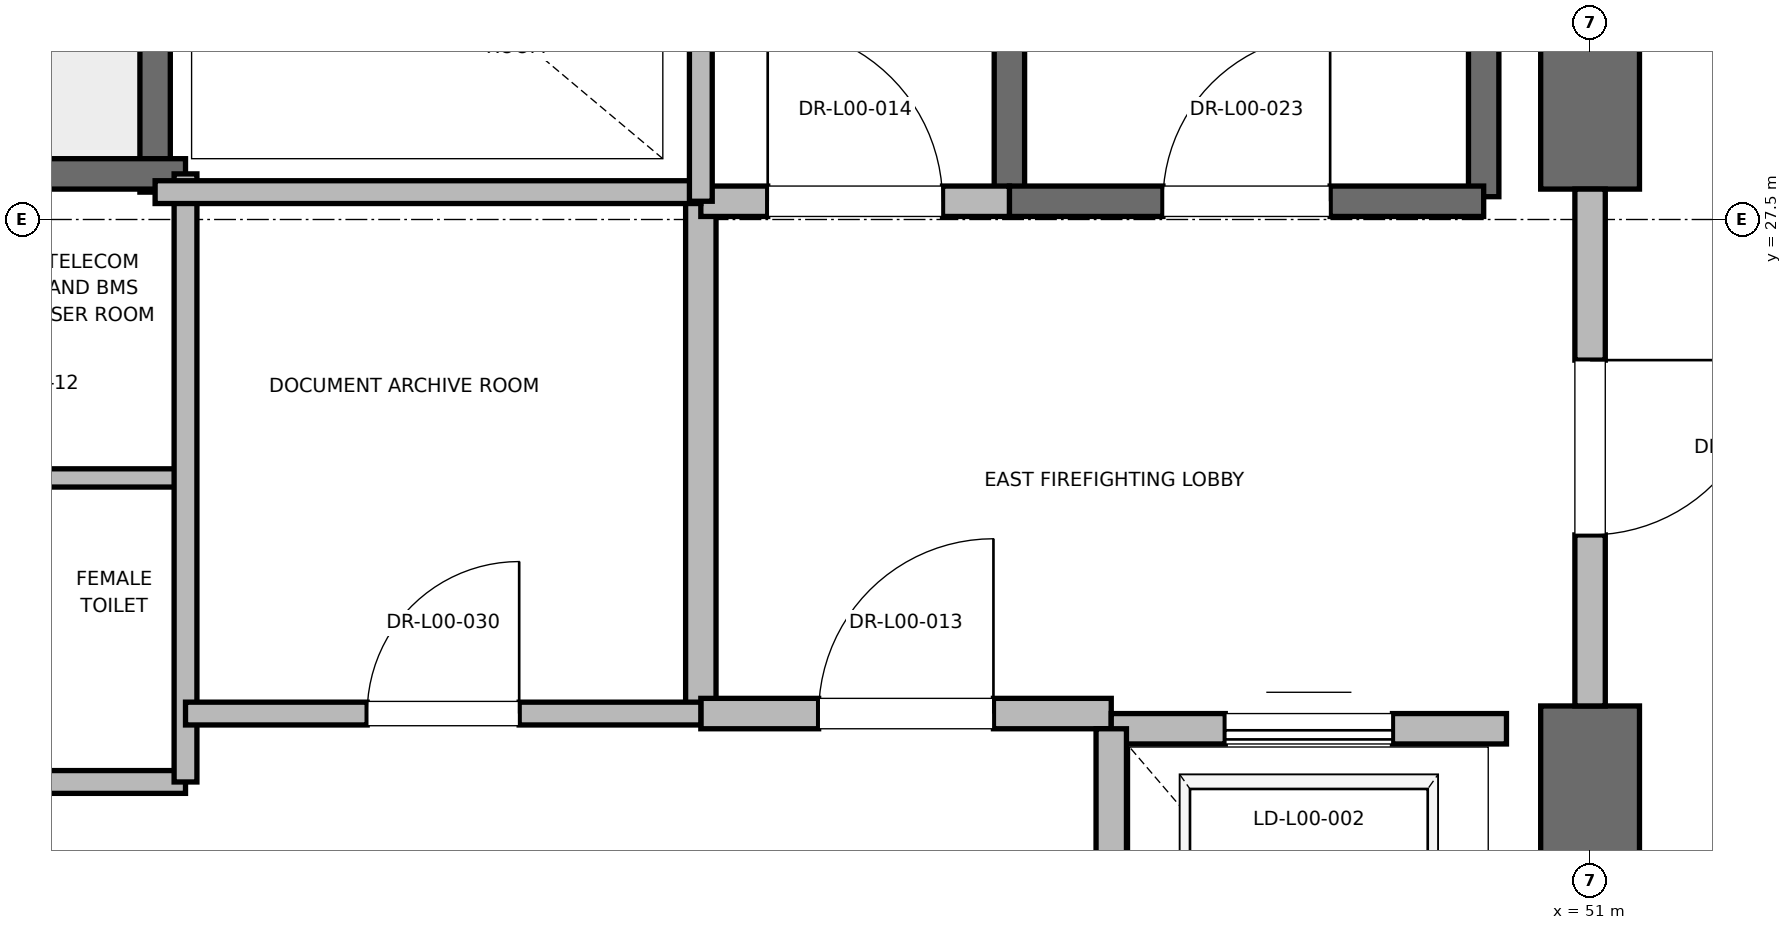
"""IFC4 building model, lengths in metres.
Left out: names, types, materials, properties, quantities, classifications, styles, units other than length and angle.
Written with IfcOpenShell. Run it as: python <this file> out.ifc"""

import sys

from ifc_helpers import new_model, si_unit, direction, frame, frame_2d, origin, place, context, subcontext, project, spatial, rectangle, extrude, element, fill, save


model = new_model("IFC4")
c1 = context("Model", 3, precision=1e-05, world=origin(), true_north=direction((0.0, 1.0)))
c2 = subcontext(c1, "Body", "Model", "MODEL_VIEW")
j1 = project(units=[si_unit("LENGTHUNIT", "METRE"), si_unit("PLANEANGLEUNIT", "RADIAN")], contexts=[c1])
p1 = place(None, origin())
s1 = spatial("IfcSite", under=j1, at=p1, CompositionType="ELEMENT")
p2 = place(p1, origin())
s2 = spatial("IfcBuilding", under=s1, at=p2, CompositionType="ELEMENT")
p3 = place(p2, origin())
s3 = spatial("IfcBuildingStorey", under=s2, at=p3, CompositionType="ELEMENT", Elevation=0.0)
p4 = place(p3, frame((51.0, 18.5, 0.0), z_axis=(0.0, 0.0, 1.0), x_axis=(0.0, 1.0, 0.0)))
e1 = element("IfcWall", 1, at=p4, inside=s3, PredefinedType="SHEAR", context=c2, shape_type="SweptSolid", body=[
    extrude(rectangle(XDim=5.8, YDim=0.65, at=frame_2d((2.9, 0.0))), origin(), (0.0, 0.0, 1.0), 5.72),
])
p5 = place(p3, frame((51.0, 27.7, 0.0), z_axis=(0.0, 0.0, 1.0), x_axis=(0.0, 1.0, 0.0)))
e2 = element("IfcWall", 2, at=p5, inside=s3, PredefinedType="SHEAR", context=c2, shape_type="SweptSolid", body=[
    extrude(rectangle(XDim=8.8, YDim=0.65, at=frame_2d((4.4, 0.0))), origin(), (0.0, 0.0, 1.0), 5.72),
])
p6 = place(p3, frame((50.3, 27.65, 0.0), z_axis=(0.0, 0.0, 1.0), x_axis=(0.0, 1.0, 0.0)))
e3 = element("IfcWall", 3, at=p6, inside=s3, PredefinedType="SOLIDWALL", context=c2, shape_type="SweptSolid", body=[
    extrude(rectangle(XDim=8.15, YDim=0.2, at=frame_2d((4.075, 0.0))), origin(), (0.0, 0.0, 1.0), 5.72),
])
p7 = place(p3, frame((47.18, 27.62, 0.0), z_axis=(0.0, 0.0, 1.0), x_axis=(0.0, 1.0, 0.0)))
e4 = element("IfcWall", 4, at=p7, inside=s3, PredefinedType="SOLIDWALL", context=c2, shape_type="SweptSolid", body=[
    extrude(rectangle(XDim=8.18, YDim=0.2, at=frame_2d((4.09, 0.0))), origin(), (0.0, 0.0, 1.0), 5.72),
])
p8 = place(p3, frame((47.18, 27.62, 0.0), z_axis=(0.0, 0.0, 1.0), x_axis=(1.0, 0.0, 0.0)))
e5 = element("IfcWall", 5, at=p8, inside=s3, PredefinedType="SOLIDWALL", context=c2, shape_type="SweptSolid", body=[
    extrude(rectangle(XDim=3.12, YDim=0.2, at=frame_2d((1.56, 0.0))), origin(), (0.0, 0.0, 1.0), 5.72),
])
p9 = place(p8, frame((1.01, 0.0, 0.0)))
e6 = element("IfcOpeningElement", 6, at=p9, cuts=e5, PredefinedType="OPENING", context=c2, shape_type="SweptSolid", body=[
    extrude(rectangle(XDim=1.1, YDim=2.15, at=frame_2d((0.55, 1.075))), frame((0.0, 0.1, 0.0), z_axis=(0.0, -1.0, 0.0), x_axis=(1.0, 0.0, 0.0)), (0.0, 0.0, 1.0), 0.2),
])
p10 = place(p3, frame((41.56, 27.68, 0.0), z_axis=(0.0, 0.0, 1.0), x_axis=(0.0, 1.0, 0.0)))
e7 = element("IfcWall", 7, at=p10, inside=s3, PredefinedType="SOLIDWALL", context=c2, shape_type="SweptSolid", body=[
    extrude(rectangle(XDim=8.57, YDim=0.2, at=frame_2d((4.285, 0.0))), origin(), (0.0, 0.0, 1.0), 5.72),
])
p11 = place(p3, frame((38.44, 27.8, 0.0), z_axis=(0.0, 0.0, 1.0), x_axis=(1.0, 0.0, 0.0)))
e8 = element("IfcWall", 8, at=p11, inside=s3, PredefinedType="SOLIDWALL", context=c2, shape_type="SweptSolid", body=[
    extrude(rectangle(XDim=3.32, YDim=0.2, at=frame_2d((1.66, 0.0))), origin(), (0.0, 0.0, 1.0), 5.72),
])
p12 = place(p3, frame((45.15, 24.25, 0.0), z_axis=(0.0, 0.0, 1.0), x_axis=(0.0, 1.0, 0.0)))
e9 = element("IfcWall", 9, at=p12, inside=s3, PredefinedType="PARTITIONING", context=c2, shape_type="SweptSolid", body=[
    extrude(rectangle(XDim=3.37, YDim=0.2, at=frame_2d((1.685, 0.0))), origin(), (0.0, 0.0, 1.0), 5.72),
])
p13 = place(p3, frame((45.15, 24.25, 0.0), z_axis=(0.0, 0.0, 1.0), x_axis=(1.0, 0.0, 0.0)))
e10 = element("IfcWall", 10, at=p13, inside=s3, PredefinedType="PARTITIONING", context=c2, shape_type="SweptSolid", body=[
    extrude(rectangle(XDim=2.7, YDim=0.2, at=frame_2d((1.35, 0.0))), origin(), (0.0, 0.0, 1.0), 5.72),
])
p14 = place(p13, frame((0.775, 0.0, 0.0)))
e11 = element("IfcOpeningElement", 11, at=p14, cuts=e10, PredefinedType="OPENING", context=c2, shape_type="SweptSolid", body=[
    extrude(rectangle(XDim=1.15, YDim=2.2, at=frame_2d((0.575, 1.1))), frame((0.0, 0.1, 0.0), z_axis=(0.0, -1.0, 0.0), x_axis=(1.0, 0.0, 0.0)), (0.0, 0.0, 1.0), 0.2),
])
p15 = place(p3, frame((45.15, 27.62, 0.0), z_axis=(0.0, 0.0, 1.0), x_axis=(1.0, 0.0, 0.0)))
e12 = element("IfcWall", 12, at=p15, inside=s3, PredefinedType="PARTITIONING", context=c2, shape_type="SweptSolid", body=[
    extrude(rectangle(XDim=2.03, YDim=0.2, at=frame_2d((1.015, 0.0))), origin(), (0.0, 0.0, 1.0), 5.72),
])
p16 = place(p15, frame((0.44, 0.0, 0.0)))
e13 = element("IfcOpeningElement", 13, at=p16, cuts=e12, PredefinedType="OPENING", context=c2, shape_type="SweptSolid", body=[
    extrude(rectangle(XDim=1.15, YDim=2.2, at=frame_2d((0.575, 1.1))), frame((0.0, 0.1, 0.0), z_axis=(0.0, -1.0, 0.0), x_axis=(1.0, 0.0, 0.0)), (0.0, 0.0, 1.0), 0.2),
])
p17 = place(p3, frame((51.0, 27.7, 0.0), z_axis=(0.0, 0.0, 1.0), x_axis=(0.0, -1.0, 0.0)))
e14 = element("IfcWall", 14, at=p17, inside=s3, PredefinedType="PARTITIONING", context=c2, shape_type="SweptSolid", body=[
    extrude(rectangle(XDim=3.4, YDim=0.2, at=frame_2d((1.7, 0.0))), origin(), (0.0, 0.0, 1.0), 4.5),
])
p18 = place(p17, frame((1.125, 0.0, 0.0)))
e15 = element("IfcOpeningElement", 15, at=p18, cuts=e14, PredefinedType="OPENING", context=c2, shape_type="SweptSolid", body=[
    extrude(rectangle(XDim=1.15, YDim=2.2, at=frame_2d((0.575, 1.1))), frame((0.0, 0.1, 0.0), z_axis=(0.0, -1.0, 0.0), x_axis=(1.0, 0.0, 0.0)), (0.0, 0.0, 1.0), 0.2),
])
p19 = place(p3, frame((50.45, 24.15, 0.0), z_axis=(0.0, 0.0, 1.0), x_axis=(-1.0, 0.0, 0.0)))
e16 = element("IfcWall", 16, at=p19, inside=s3, PredefinedType="SOLIDWALL", context=c2, shape_type="SweptSolid", body=[
    extrude(rectangle(XDim=2.6, YDim=0.2, at=frame_2d((1.3, 0.0))), origin(), (0.0, 0.0, 1.0), 4.5),
])
p20 = place(p19, frame((0.75, 0.0, 0.0)))
e17 = element("IfcOpeningElement", 17, at=p20, cuts=e16, PredefinedType="OPENING", context=c2, shape_type="SweptSolid", body=[
    extrude(rectangle(XDim=1.1, YDim=2.2, at=frame_2d((0.55, 1.1))), frame((0.0, 0.1, 0.0), z_axis=(0.0, -1.0, 0.0), x_axis=(1.0, 0.0, 0.0)), (0.0, 0.0, 1.0), 0.2),
])
p21 = place(p3, frame((47.85, 24.15, 0.0), z_axis=(0.0, 0.0, 1.0), x_axis=(0.0, -1.0, 0.0)))
e18 = element("IfcWall", 18, at=p21, inside=s3, PredefinedType="SOLIDWALL", context=c2, shape_type="SweptSolid", body=[
    extrude(rectangle(XDim=3.0, YDim=0.2, at=frame_2d((1.5, 0.0))), origin(), (0.0, 0.0, 1.0), 5.72),
])
p22 = place(p3, frame((39.95, 23.8, 0.0), z_axis=(0.0, 0.0, 1.0), x_axis=(1.0, 0.0, 0.0)))
e19 = element("IfcWall", 19, at=p22, inside=s3, PredefinedType="PARTITIONING", context=c2, shape_type="SweptSolid", body=[
    extrude(rectangle(XDim=1.81, YDim=0.15, at=frame_2d((0.905, 0.0))), origin(), (0.0, 0.0, 1.0), 2.85),
])
p23 = place(p3, frame((39.95, 25.8, 0.0), z_axis=(0.0, 0.0, 1.0), x_axis=(1.0, 0.0, 0.0)))
e20 = element("IfcWall", 20, at=p23, inside=s3, PredefinedType="PARTITIONING", context=c2, shape_type="SweptSolid", body=[
    extrude(rectangle(XDim=1.81, YDim=0.12, at=frame_2d((0.905, 0.0))), origin(), (0.0, 0.0, 1.0), 2.85),
])
p24 = place(p3, frame((41.76, 23.8, 0.0), z_axis=(0.0, 0.0, 1.0), x_axis=(0.0, 1.0, 0.0)))
e21 = element("IfcWall", 21, at=p24, inside=s3, PredefinedType="PARTITIONING", context=c2, shape_type="SweptSolid", body=[
    extrude(rectangle(XDim=4.0, YDim=0.15, at=frame_2d((2.0, 0.0))), origin(), (0.0, 0.0, 1.0), 2.85),
])
p25 = place(p3, frame((41.56, 27.68, 0.0), z_axis=(0.0, 0.0, 1.0), x_axis=(1.0, 0.0, 0.0)))
e22 = element("IfcWall", 22, at=p25, inside=s3, PredefinedType="PARTITIONING", context=c2, shape_type="SweptSolid", body=[
    extrude(rectangle(XDim=3.59, YDim=0.15, at=frame_2d((1.795, 0.0))), origin(), (0.0, 0.0, 1.0), 2.85),
])
p26 = place(p3, frame((41.76, 24.25, 0.0), z_axis=(0.0, 0.0, 1.0), x_axis=(1.0, 0.0, 0.0)))
e23 = element("IfcWall", 23, at=p26, inside=s3, PredefinedType="PARTITIONING", context=c2, shape_type="SweptSolid", body=[
    extrude(rectangle(XDim=3.39, YDim=0.15, at=frame_2d((1.695, 0.0))), origin(), (0.0, 0.0, 1.0), 2.85),
])
p27 = place(p26, frame((1.195, 0.0, 0.0)))
e24 = element("IfcOpeningElement", 24, at=p27, cuts=e23, PredefinedType="OPENING", context=c2, shape_type="SweptSolid", body=[
    extrude(rectangle(XDim=1.0, YDim=2.15, at=frame_2d((0.5, 1.075))), frame((0.0, 0.075, 0.0), z_axis=(0.0, -1.0, 0.0), x_axis=(1.0, 0.0, 0.0)), (0.0, 0.0, 1.0), 0.15),
])
p28 = place(p3, frame((45.15, 27.62, 0.0), z_axis=(0.0, 0.0, 1.0), x_axis=(0.0, 1.0, 0.0)))
e25 = element("IfcWall", 25, at=p28, inside=s3, PredefinedType="PARTITIONING", context=c2, shape_type="SweptSolid", body=[
    extrude(rectangle(XDim=3.1, YDim=0.15, at=frame_2d((1.55, 0.0))), origin(), (0.0, 0.0, 1.0), 2.85),
])
p29 = place(p9, origin())
e26 = element("IfcDoor", 26, at=p29, inside=s3, OperationType="SINGLE_SWING_RIGHT", PredefinedType="DOOR", context=c2, shape_type="SweptSolid", body=[
    extrude(rectangle(XDim=1.1, YDim=2.15, at=frame_2d((0.55, 1.075))), frame((0.0, 0.025, 0.0), z_axis=(0.0, -1.0, 0.0), x_axis=(1.0, 0.0, 0.0)), (0.0, 0.0, 1.0), 0.05),
])
fill(e6, e26)
p30 = place(p14, origin())
e27 = element("IfcDoor", 27, at=p30, inside=s3, OperationType="SINGLE_SWING_RIGHT", PredefinedType="DOOR", context=c2, shape_type="SweptSolid", body=[
    extrude(rectangle(XDim=1.15, YDim=2.2, at=frame_2d((0.575, 1.1))), frame((0.0, 0.025, 0.0), z_axis=(0.0, -1.0, 0.0), x_axis=(1.0, 0.0, 0.0)), (0.0, 0.0, 1.0), 0.05),
])
fill(e11, e27)
p31 = place(p16, origin())
e28 = element("IfcDoor", 28, at=p31, inside=s3, OperationType="SINGLE_SWING_LEFT", PredefinedType="DOOR", context=c2, shape_type="SweptSolid", body=[
    extrude(rectangle(XDim=1.15, YDim=2.2, at=frame_2d((0.575, 1.1))), frame((0.0, 0.025, 0.0), z_axis=(0.0, -1.0, 0.0), x_axis=(1.0, 0.0, 0.0)), (0.0, 0.0, 1.0), 0.05),
])
fill(e13, e28)
p32 = place(p18, origin())
e29 = element("IfcDoor", 29, at=p32, inside=s3, OperationType="SINGLE_SWING_LEFT", PredefinedType="DOOR", context=c2, shape_type="SweptSolid", body=[
    extrude(rectangle(XDim=1.15, YDim=2.2, at=frame_2d((0.575, 1.1))), frame((0.0, 0.025, 0.0), z_axis=(0.0, -1.0, 0.0), x_axis=(1.0, 0.0, 0.0)), (0.0, 0.0, 1.0), 0.05),
])
fill(e15, e29)
p33 = place(p20, origin())
e30 = element("IfcDoor", 30, at=p33, inside=s3, OperationType="SLIDING_TO_RIGHT", PredefinedType="DOOR", context=c2, shape_type="SweptSolid", body=[
    extrude(rectangle(XDim=1.1, YDim=2.2, at=frame_2d((0.55, 1.1))), frame((0.0, 0.025, 0.0), z_axis=(0.0, -1.0, 0.0), x_axis=(1.0, 0.0, 0.0)), (0.0, 0.0, 1.0), 0.05),
])
fill(e17, e30)
p34 = place(p27, origin())
e31 = element("IfcDoor", 31, at=p34, inside=s3, OperationType="SINGLE_SWING_RIGHT", PredefinedType="DOOR", context=c2, shape_type="SweptSolid", body=[
    extrude(rectangle(XDim=1.0, YDim=2.15, at=frame_2d((0.5, 1.075))), frame((0.0, 0.025, 0.0), z_axis=(0.0, -1.0, 0.0), x_axis=(1.0, 0.0, 0.0)), (0.0, 0.0, 1.0), 0.05),
])
fill(e24, e31)
save(model, sys.argv[1])
